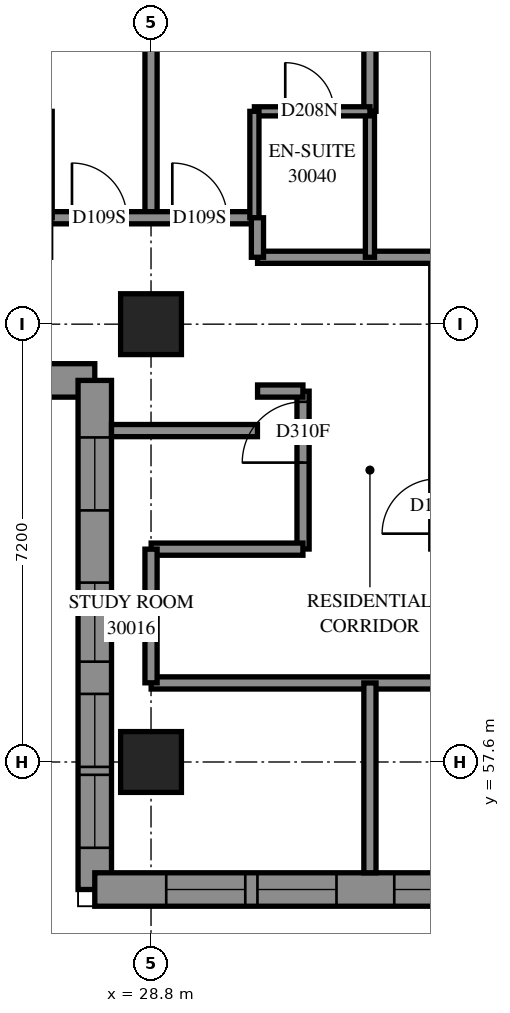
"""IFC4 building model, lengths in metres.
Left out: names, types, materials, properties, quantities, classifications, styles, units other than length and angle.
Written with IfcOpenShell. Run it as: python <this file> out.ifc"""

import sys

from ifc_helpers import new_model, si_unit, direction, frame, frame_2d, origin, origin_2d, place, context, subcontext, project, spatial, polyline, rectangle, outline, extrude, element, fill, save


model = new_model("IFC4")
c1 = context("Model", 3, precision=1e-05, world=origin(), true_north=direction((0.0, 1.0)))
c2 = subcontext(c1, "Body", "Model", "MODEL_VIEW")
j1 = project(units=[si_unit("LENGTHUNIT", "METRE"), si_unit("PLANEANGLEUNIT", "RADIAN")], contexts=[c1])
p1 = place(None, origin())
s1 = spatial("IfcSite", under=j1, at=p1, CompositionType="ELEMENT")
p2 = place(p1, origin())
s2 = spatial("IfcBuilding", under=s1, at=p2, CompositionType="ELEMENT")
p3 = place(p2, frame((0.0, 0.0, 111.8)))
s3 = spatial("IfcBuildingStorey", under=s2, at=p3, CompositionType="ELEMENT", Elevation=111.8)
for number, where, z_axis, x_axis in (
    (1, (28.8, 57.6, 0.0), (0.0, 0.0, 1.0), (1.0, 0.0, 0.0)),
    (2, (28.8, 64.8, 0.0), (0.0, 0.0, 1.0), (1.0, 0.0, 0.0)),
):
    element("IfcColumn", number, at=place(p3, frame(where, z_axis=z_axis, x_axis=x_axis)), inside=s3, PredefinedType="COLUMN", context=c2, shape_type="SweptSolid", body=[
        extrude(rectangle(XDim=1.0, YDim=1.0, at=origin_2d()), origin(), (0.0, 0.0, 1.0), 3.1),
    ])
p4 = place(p3, frame((19.503, 63.875, 0.0), z_axis=(0.0, 0.0, 1.0), x_axis=(1.0, 0.0, 0.0)))
e3 = element("IfcWall", 3, at=p4, inside=s3, PredefinedType="SOLIDWALL", context=c2, shape_type="SweptSolid", body=[
    extrude(outline(polyline([(-0.275, -0.275), (8.097, -0.275), (8.647, 0.275), (0.275, 0.275), (-0.275, -0.275)])), origin(), (0.0, 0.0, 1.0), 3.1),
])
p5 = place(p4, frame((2.247, 0.0, 0.5)))
e4 = element("IfcOpeningElement", 4, at=p5, cuts=e3, PredefinedType="OPENING", context=c2, shape_type="SweptSolid", body=[
    extrude(rectangle(XDim=1.3, YDim=2.45, at=frame_2d((0.65, 1.225))), frame((0.0, 0.285, 0.0), z_axis=(0.0, -1.0, 0.0), x_axis=(1.0, 0.0, 0.0)), (0.0, 0.0, 1.0), 0.57),
])
p6 = place(p4, frame((3.747, 0.0, 0.5)))
e5 = element("IfcOpeningElement", 5, at=p6, cuts=e3, PredefinedType="OPENING", context=c2, shape_type="SweptSolid", body=[
    extrude(rectangle(XDim=1.3, YDim=2.45, at=frame_2d((0.65, 1.225))), frame((0.0, 0.285, 0.0), z_axis=(0.0, -1.0, 0.0), x_axis=(1.0, 0.0, 0.0)), (0.0, 0.0, 1.0), 0.57),
])
p7 = place(p4, frame((0.686, 0.0, 0.5)))
e6 = element("IfcOpeningElement", 6, at=p7, cuts=e3, PredefinedType="OPENING", context=c2, shape_type="SweptSolid", body=[
    extrude(rectangle(XDim=1.2, YDim=2.45, at=frame_2d((0.6, 1.225))), frame((0.0, 0.285, 0.0), z_axis=(0.0, -1.0, 0.0), x_axis=(1.0, 0.0, 0.0)), (0.0, 0.0, 1.0), 0.57),
])
p8 = place(p4, frame((6.335, 0.0, 0.5)))
e7 = element("IfcOpeningElement", 7, at=p8, cuts=e3, PredefinedType="OPENING", context=c2, shape_type="SweptSolid", body=[
    extrude(rectangle(XDim=1.2, YDim=2.45, at=frame_2d((0.6, 1.225))), frame((0.0, 0.285, 0.0), z_axis=(0.0, -1.0, 0.0), x_axis=(1.0, 0.0, 0.0)), (0.0, 0.0, 1.0), 0.57),
])
p9 = place(p3, frame((27.875, 63.875, 0.0), z_axis=(0.0, 0.0, 1.0), x_axis=(0.0, -1.0, 0.0)))
e8 = element("IfcWall", 8, at=p9, inside=s3, PredefinedType="SOLIDWALL", context=c2, shape_type="SweptSolid", body=[
    extrude(outline(polyline([(0.275, -0.275), (8.647, -0.275), (8.097, 0.275), (-0.275, 0.275), (0.275, -0.275)])), origin(), (0.0, 0.0, 1.0), 3.1),
])
p10 = place(p9, frame((3.325, 0.0, 0.5)))
e9 = element("IfcOpeningElement", 9, at=p10, cuts=e8, PredefinedType="OPENING", context=c2, shape_type="SweptSolid", body=[
    extrude(rectangle(XDim=1.3, YDim=2.45, at=frame_2d((0.65, 1.225))), frame((0.0, 0.285, 0.0), z_axis=(0.0, -1.0, 0.0), x_axis=(1.0, 0.0, 0.0)), (0.0, 0.0, 1.0), 0.57),
])
p11 = place(p9, frame((0.938, 0.0, 0.5)))
e10 = element("IfcOpeningElement", 10, at=p11, cuts=e8, PredefinedType="OPENING", context=c2, shape_type="SweptSolid", body=[
    extrude(rectangle(XDim=1.2, YDim=2.45, at=frame_2d((0.6, 1.225))), frame((0.0, 0.285, 0.0), z_axis=(0.0, -1.0, 0.0), x_axis=(1.0, 0.0, 0.0)), (0.0, 0.0, 1.0), 0.57),
])
p12 = place(p9, frame((6.486, 0.0, 0.5)))
e11 = element("IfcOpeningElement", 11, at=p12, cuts=e8, PredefinedType="OPENING", context=c2, shape_type="SweptSolid", body=[
    extrude(rectangle(XDim=1.2, YDim=2.45, at=frame_2d((0.6, 1.225))), frame((0.0, 0.285, 0.0), z_axis=(0.0, -1.0, 0.0), x_axis=(1.0, 0.0, 0.0)), (0.0, 0.0, 1.0), 0.57),
])
p13 = place(p9, frame((5.155, 0.0, 0.5)))
e12 = element("IfcOpeningElement", 12, at=p13, cuts=e8, PredefinedType="OPENING", context=c2, shape_type="SweptSolid", body=[
    extrude(rectangle(XDim=1.2, YDim=2.45, at=frame_2d((0.6, 1.225))), frame((0.0, 0.285, 0.0), z_axis=(0.0, -1.0, 0.0), x_axis=(1.0, 0.0, 0.0)), (0.0, 0.0, 1.0), 0.57),
])
p14 = place(p3, frame((27.875, 55.503, 0.0), z_axis=(0.0, 0.0, 1.0), x_axis=(1.0, 0.0, 0.0)))
e13 = element("IfcWall", 13, at=p14, inside=s3, PredefinedType="SOLIDWALL", context=c2, shape_type="SweptSolid", body=[
    extrude(outline(polyline([(-0.275, -0.275), (14.125, -0.275), (14.675, 0.275), (0.275, 0.275), (-0.275, -0.275)])), origin(), (0.0, 0.0, 1.0), 3.1),
])
p15 = place(p14, frame((1.175, 0.0, 0.5)))
e14 = element("IfcOpeningElement", 14, at=p15, cuts=e13, PredefinedType="OPENING", context=c2, shape_type="SweptSolid", body=[
    extrude(rectangle(XDim=1.3, YDim=2.45, at=frame_2d((0.65, 1.225))), frame((0.0, 0.285, 0.0), z_axis=(0.0, -1.0, 0.0), x_axis=(1.0, 0.0, 0.0)), (0.0, 0.0, 1.0), 0.57),
])
p16 = place(p14, frame((2.675, 0.0, 0.5)))
e15 = element("IfcOpeningElement", 15, at=p16, cuts=e13, PredefinedType="OPENING", context=c2, shape_type="SweptSolid", body=[
    extrude(rectangle(XDim=1.3, YDim=2.45, at=frame_2d((0.65, 1.225))), frame((0.0, 0.285, 0.0), z_axis=(0.0, -1.0, 0.0), x_axis=(1.0, 0.0, 0.0)), (0.0, 0.0, 1.0), 0.57),
])
p17 = place(p14, frame((4.925, 0.0, 0.5)))
e16 = element("IfcOpeningElement", 16, at=p17, cuts=e13, PredefinedType="OPENING", context=c2, shape_type="SweptSolid", body=[
    extrude(rectangle(XDim=1.3, YDim=2.45, at=frame_2d((0.65, 1.225))), frame((0.0, 0.285, 0.0), z_axis=(0.0, -1.0, 0.0), x_axis=(1.0, 0.0, 0.0)), (0.0, 0.0, 1.0), 0.57),
])
p18 = place(p14, frame((6.425, 0.0, 0.5)))
e17 = element("IfcOpeningElement", 17, at=p18, cuts=e13, PredefinedType="OPENING", context=c2, shape_type="SweptSolid", body=[
    extrude(rectangle(XDim=1.3, YDim=2.45, at=frame_2d((0.65, 1.225))), frame((0.0, 0.285, 0.0), z_axis=(0.0, -1.0, 0.0), x_axis=(1.0, 0.0, 0.0)), (0.0, 0.0, 1.0), 0.57),
])
p19 = place(p14, frame((8.275, 0.0, 0.5)))
e18 = element("IfcOpeningElement", 18, at=p19, cuts=e13, PredefinedType="OPENING", context=c2, shape_type="SweptSolid", body=[
    extrude(rectangle(XDim=1.3, YDim=2.45, at=frame_2d((0.65, 1.225))), frame((0.0, 0.285, 0.0), z_axis=(0.0, -1.0, 0.0), x_axis=(1.0, 0.0, 0.0)), (0.0, 0.0, 1.0), 0.57),
])
p20 = place(p14, frame((9.775, 0.0, 0.5)))
e19 = element("IfcOpeningElement", 19, at=p20, cuts=e13, PredefinedType="OPENING", context=c2, shape_type="SweptSolid", body=[
    extrude(rectangle(XDim=1.3, YDim=2.45, at=frame_2d((0.65, 1.225))), frame((0.0, 0.285, 0.0), z_axis=(0.0, -1.0, 0.0), x_axis=(1.0, 0.0, 0.0)), (0.0, 0.0, 1.0), 0.57),
])
p21 = place(p14, frame((12.363, 0.0, 0.5)))
e20 = element("IfcOpeningElement", 20, at=p21, cuts=e13, PredefinedType="OPENING", context=c2, shape_type="SweptSolid", body=[
    extrude(rectangle(XDim=1.2, YDim=2.45, at=frame_2d((0.6, 1.225))), frame((0.0, 0.285, 0.0), z_axis=(0.0, -1.0, 0.0), x_axis=(1.0, 0.0, 0.0)), (0.0, 0.0, 1.0), 0.57),
])
p22 = place(p3, frame((28.802, 58.9, 0.0), z_axis=(0.0, 0.0, 1.0), x_axis=(1.0, 0.0, 0.0)))
e21 = element("IfcWall", 21, at=p22, inside=s3, PredefinedType="PARTITIONING", context=c2, shape_type="SweptSolid", body=[
    extrude(rectangle(XDim=24.098, YDim=0.2, at=frame_2d((12.049, 0.0))), origin(), (0.0, 0.0, 1.0), 3.1),
])
p23 = place(p22, frame((11.323, 0.0, 0.0)))
e22 = element("IfcOpeningElement", 22, at=p23, cuts=e21, PredefinedType="OPENING", context=c2, shape_type="SweptSolid", body=[
    extrude(rectangle(XDim=1.0, YDim=2.1, at=frame_2d((0.5, 1.05))), frame((0.0, 0.11, 0.0), z_axis=(0.0, -1.0, 0.0), x_axis=(1.0, 0.0, 0.0)), (0.0, 0.0, 1.0), 0.22),
])
p24 = place(p22, frame((14.908, 0.0, 0.0)))
e23 = element("IfcOpeningElement", 23, at=p24, cuts=e21, PredefinedType="OPENING", context=c2, shape_type="SweptSolid", body=[
    extrude(rectangle(XDim=0.9, YDim=2.1, at=frame_2d((0.45, 1.05))), frame((0.0, 0.11, 0.0), z_axis=(0.0, -1.0, 0.0), x_axis=(1.0, 0.0, 0.0)), (0.0, 0.0, 1.0), 0.22),
])
p25 = place(p22, frame((18.523, 0.0, 0.0)))
e24 = element("IfcOpeningElement", 24, at=p25, cuts=e21, PredefinedType="OPENING", context=c2, shape_type="SweptSolid", body=[
    extrude(rectangle(XDim=1.0, YDim=2.1, at=frame_2d((0.5, 1.05))), frame((0.0, 0.11, 0.0), z_axis=(0.0, -1.0, 0.0), x_axis=(1.0, 0.0, 0.0)), (0.0, 0.0, 1.0), 0.22),
])
p26 = place(p22, frame((22.845, 0.0, 0.0)))
e25 = element("IfcOpeningElement", 25, at=p26, cuts=e21, PredefinedType="OPENING", context=c2, shape_type="SweptSolid", body=[
    extrude(rectangle(XDim=1.0, YDim=2.1, at=frame_2d((0.5, 1.05))), frame((0.0, 0.11, 0.0), z_axis=(0.0, -1.0, 0.0), x_axis=(1.0, 0.0, 0.0)), (0.0, 0.0, 1.0), 0.22),
])
p27 = place(p3, frame((28.8, 66.55, 0.0), z_axis=(0.0, 0.0, 1.0), x_axis=(0.0, 1.0, 0.0)))
e26 = element("IfcWall", 26, at=p27, inside=s3, PredefinedType="PARTITIONING", context=c2, shape_type="SweptSolid", body=[
    extrude(rectangle(XDim=4.95, YDim=0.2, at=frame_2d((2.475, 0.0))), origin(), (0.0, 0.0, 1.0), 3.1),
])
p28 = place(p3, frame((32.4, 68.3, 0.0), z_axis=(0.0, 0.0, 1.0), x_axis=(0.0, 1.0, 0.0)))
e27 = element("IfcWall", 27, at=p28, inside=s3, PredefinedType="PARTITIONING", context=c2, shape_type="SweptSolid", body=[
    extrude(rectangle(XDim=4.606, YDim=0.2, at=frame_2d((2.303, 0.0))), origin(), (0.0, 0.0, 1.0), 3.1),
])
p29 = place(p3, frame((27.1, 66.55, 0.0), z_axis=(0.0, 0.0, 1.0), x_axis=(1.0, 0.0, 0.0)))
e28 = element("IfcWall", 28, at=p29, inside=s3, PredefinedType="PARTITIONING", context=c2, shape_type="SweptSolid", body=[
    extrude(rectangle(XDim=3.4, YDim=0.2, at=frame_2d((1.7, 0.0))), origin(), (0.0, 0.0, 1.0), 3.1),
])
p30 = place(p29, frame((0.4, 0.0, 0.0)))
e29 = element("IfcOpeningElement", 29, at=p30, cuts=e28, PredefinedType="OPENING", context=c2, shape_type="SweptSolid", body=[
    extrude(rectangle(XDim=0.9, YDim=2.1, at=frame_2d((0.45, 1.05))), frame((0.0, 0.11, 0.0), z_axis=(0.0, -1.0, 0.0), x_axis=(1.0, 0.0, 0.0)), (0.0, 0.0, 1.0), 0.22),
])
p31 = place(p29, frame((2.05, 0.0, 0.0)))
e30 = element("IfcOpeningElement", 30, at=p31, cuts=e28, PredefinedType="OPENING", context=c2, shape_type="SweptSolid", body=[
    extrude(rectangle(XDim=0.9, YDim=2.1, at=frame_2d((0.45, 1.05))), frame((0.0, 0.11, 0.0), z_axis=(0.0, -1.0, 0.0), x_axis=(1.0, 0.0, 0.0)), (0.0, 0.0, 1.0), 0.22),
])
p32 = place(p3, frame((32.4, 55.778, 0.0), z_axis=(0.0, 0.0, 1.0), x_axis=(0.0, 1.0, 0.0)))
e31 = element("IfcWall", 31, at=p32, inside=s3, PredefinedType="PARTITIONING", context=c2, shape_type="SweptSolid", body=[
    extrude(rectangle(XDim=3.122, YDim=0.2, at=frame_2d((1.561, 0.0))), origin(), (0.0, 0.0, 1.0), 3.1),
])
p33 = place(p3, frame((30.552, 65.9, 0.0), z_axis=(0.0, 0.0, 1.0), x_axis=(1.0, 0.0, 0.0)))
e32 = element("IfcWall", 32, at=p33, inside=s3, PredefinedType="PARTITIONING", context=c2, shape_type="SweptSolid", body=[
    extrude(rectangle(XDim=2.948, YDim=0.2, at=frame_2d((1.474, 0.0))), origin(), (0.0, 0.0, 1.0), 3.1),
])
p34 = place(p3, frame((31.3, 61.102, 0.0), z_axis=(0.0, 0.0, 1.0), x_axis=(0.0, 1.0, 0.0)))
e33 = element("IfcWall", 33, at=p34, inside=s3, PredefinedType="PARTITIONING", context=c2, shape_type="SweptSolid", body=[
    extrude(rectangle(XDim=2.596, YDim=0.2, at=frame_2d((1.298, 0.0))), origin(), (0.0, 0.0, 1.0), 3.1),
])
p35 = place(p34, frame((1.421, 0.0, 0.0)))
e34 = element("IfcOpeningElement", 34, at=p35, cuts=e33, PredefinedType="OPENING", context=c2, shape_type="SweptSolid", body=[
    extrude(rectangle(XDim=1.0, YDim=2.1, at=frame_2d((0.5, 1.05))), frame((0.0, 0.11, 0.0), z_axis=(0.0, -1.0, 0.0), x_axis=(1.0, 0.0, 0.0)), (0.0, 0.0, 1.0), 0.22),
])
p36 = place(p3, frame((28.802, 61.1, 0.0), z_axis=(0.0, 0.0, 1.0), x_axis=(1.0, 0.0, 0.0)))
e35 = element("IfcWall", 35, at=p36, inside=s3, PredefinedType="PARTITIONING", context=c2, shape_type="SweptSolid", body=[
    extrude(rectangle(XDim=2.496, YDim=0.2, at=frame_2d((1.248, 0.0))), origin(), (0.0, 0.0, 1.0), 3.1),
])
p37 = place(p3, frame((32.4, 65.9, 0.0), z_axis=(0.0, 0.0, 1.0), x_axis=(0.0, 1.0, 0.0)))
e36 = element("IfcWall", 36, at=p37, inside=s3, PredefinedType="PARTITIONING", context=c2, shape_type="SweptSolid", body=[
    extrude(rectangle(XDim=2.4, YDim=0.15, at=frame_2d((1.2, 0.0))), origin(), (0.0, 0.0, 1.0), 3.1),
])
p38 = place(p3, frame((28.15, 63.05, 0.0), z_axis=(0.0, 0.0, 1.0), x_axis=(1.0, 0.0, 0.0)))
e37 = element("IfcWall", 37, at=p38, inside=s3, PredefinedType="PARTITIONING", context=c2, shape_type="SweptSolid", body=[
    extrude(rectangle(XDim=2.4, YDim=0.2, at=frame_2d((1.2, 0.0))), origin(), (0.0, 0.0, 1.0), 3.1),
])
p39 = place(p3, frame((28.8, 58.902, 0.0), z_axis=(0.0, 0.0, 1.0), x_axis=(0.0, 1.0, 0.0)))
e38 = element("IfcWall", 38, at=p39, inside=s3, PredefinedType="PARTITIONING", context=c2, shape_type="SweptSolid", body=[
    extrude(rectangle(XDim=2.198, YDim=0.2, at=frame_2d((1.099, 0.0))), origin(), (0.0, 0.0, 1.0), 2.6),
])
p40 = place(p3, frame((30.5, 68.3, 0.0), z_axis=(0.0, 0.0, 1.0), x_axis=(1.0, 0.0, 0.0)))
e39 = element("IfcWall", 39, at=p40, inside=s3, PredefinedType="PARTITIONING", context=c2, shape_type="SweptSolid", body=[
    extrude(rectangle(XDim=1.9, YDim=0.15, at=frame_2d((0.95, 0.0))), origin(), (0.0, 0.0, 1.0), 3.1),
])
p41 = place(p40, frame((0.507, 0.0, 0.0)))
e40 = element("IfcOpeningElement", 40, at=p41, cuts=e39, PredefinedType="OPENING", context=c2, shape_type="SweptSolid", body=[
    extrude(rectangle(XDim=0.8, YDim=2.1, at=frame_2d((0.4, 1.05))), frame((0.0, 0.085, 0.0), z_axis=(0.0, -1.0, 0.0), x_axis=(1.0, 0.0, 0.0)), (0.0, 0.0, 1.0), 0.17),
])
for number, where, z_axis, x_axis in (
    (41, (27.1, 66.55, 0.0), (0.0, 0.0, 1.0), (0.0, 1.0, 0.0)),
    (42, (30.5, 66.55, 0.0), (0.0, 0.0, 1.0), (0.0, 1.0, 0.0)),
):
    element("IfcWall", number, at=place(p3, frame(where, z_axis=z_axis, x_axis=x_axis)), inside=s3, PredefinedType="PARTITIONING", context=c2, shape_type="SweptSolid", body=[
        extrude(rectangle(XDim=1.75, YDim=0.15, at=frame_2d((0.875, 0.0))), origin(), (0.0, 0.0, 1.0), 3.1),
    ])
p42 = place(p3, frame((30.552, 63.7, 0.0), z_axis=(0.0, 0.0, 1.0), x_axis=(1.0, 0.0, 0.0)))
e43 = element("IfcWall", 43, at=p42, inside=s3, PredefinedType="PARTITIONING", context=c2, shape_type="SweptSolid", body=[
    extrude(rectangle(XDim=0.746, YDim=0.2, at=frame_2d((0.373, 0.0))), origin(), (0.0, 0.0, 1.0), 3.1),
])
p43 = place(p3, frame((30.55, 65.9, 0.0), z_axis=(0.0, 0.0, 1.0), x_axis=(0.0, 1.0, 0.0)))
e44 = element("IfcWall", 44, at=p43, inside=s3, PredefinedType="PARTITIONING", context=c2, shape_type="SweptSolid", body=[
    extrude(rectangle(XDim=0.65, YDim=0.2, at=frame_2d((0.325, 0.0))), origin(), (0.0, 0.0, 1.0), 3.1),
])
p44 = place(p10, origin())
e45 = element("IfcWindow", 45, at=p44, inside=s3, PartitioningType="SINGLE_PANEL", PredefinedType="WINDOW", context=c2, shape_type="SweptSolid", body=[
    extrude(rectangle(XDim=1.3, YDim=2.45, at=frame_2d((0.65, 1.225))), frame((0.0, 0.155, 0.0), z_axis=(0.0, -1.0, 0.0), x_axis=(1.0, 0.0, 0.0)), (0.0, 0.0, 1.0), 0.06),
])
fill(e9, e45)
p45 = place(p11, origin())
e46 = element("IfcWindow", 46, at=p45, inside=s3, PartitioningType="SINGLE_PANEL", PredefinedType="WINDOW", context=c2, shape_type="SweptSolid", body=[
    extrude(rectangle(XDim=1.2, YDim=2.45, at=frame_2d((0.6, 1.225))), frame((0.0, 0.155, 0.0), z_axis=(0.0, -1.0, 0.0), x_axis=(1.0, 0.0, 0.0)), (0.0, 0.0, 1.0), 0.06),
])
fill(e10, e46)
p46 = place(p12, origin())
e47 = element("IfcWindow", 47, at=p46, inside=s3, PartitioningType="SINGLE_PANEL", PredefinedType="WINDOW", context=c2, shape_type="SweptSolid", body=[
    extrude(rectangle(XDim=1.2, YDim=2.45, at=frame_2d((0.6, 1.225))), frame((0.0, 0.155, 0.0), z_axis=(0.0, -1.0, 0.0), x_axis=(1.0, 0.0, 0.0)), (0.0, 0.0, 1.0), 0.06),
])
fill(e11, e47)
p47 = place(p15, origin())
e48 = element("IfcWindow", 48, at=p47, inside=s3, PartitioningType="SINGLE_PANEL", PredefinedType="WINDOW", context=c2, shape_type="SweptSolid", body=[
    extrude(rectangle(XDim=1.3, YDim=2.45, at=frame_2d((0.65, 1.225))), frame((0.0, 0.155, 0.0), z_axis=(0.0, -1.0, 0.0), x_axis=(1.0, 0.0, 0.0)), (0.0, 0.0, 1.0), 0.06),
])
fill(e14, e48)
p48 = place(p16, origin())
e49 = element("IfcWindow", 49, at=p48, inside=s3, PartitioningType="SINGLE_PANEL", PredefinedType="WINDOW", context=c2, shape_type="SweptSolid", body=[
    extrude(rectangle(XDim=1.3, YDim=2.45, at=frame_2d((0.65, 1.225))), frame((0.0, 0.155, 0.0), z_axis=(0.0, -1.0, 0.0), x_axis=(1.0, 0.0, 0.0)), (0.0, 0.0, 1.0), 0.06),
])
fill(e15, e49)
p49 = place(p17, origin())
e50 = element("IfcWindow", 50, at=p49, inside=s3, PartitioningType="SINGLE_PANEL", PredefinedType="WINDOW", context=c2, shape_type="SweptSolid", body=[
    extrude(rectangle(XDim=1.3, YDim=2.45, at=frame_2d((0.65, 1.225))), frame((0.0, 0.155, 0.0), z_axis=(0.0, -1.0, 0.0), x_axis=(1.0, 0.0, 0.0)), (0.0, 0.0, 1.0), 0.06),
])
fill(e16, e50)
p50 = place(p35, origin())
e51 = element("IfcDoor", 51, at=p50, inside=s3, OperationType="SINGLE_SWING_LEFT", PredefinedType="DOOR", context=c2, shape_type="SweptSolid", body=[
    extrude(rectangle(XDim=1.0, YDim=2.1, at=frame_2d((0.5, 1.05))), frame((0.0, 0.025, 0.0), z_axis=(0.0, -1.0, 0.0), x_axis=(1.0, 0.0, 0.0)), (0.0, 0.0, 1.0), 0.05),
])
fill(e34, e51)
p51 = place(p30, origin())
e52 = element("IfcDoor", 52, at=p51, inside=s3, OperationType="SINGLE_SWING_LEFT", PredefinedType="DOOR", context=c2, shape_type="SweptSolid", body=[
    extrude(rectangle(XDim=0.9, YDim=2.1, at=frame_2d((0.45, 1.05))), frame((0.0, 0.025, 0.0), z_axis=(0.0, -1.0, 0.0), x_axis=(1.0, 0.0, 0.0)), (0.0, 0.0, 1.0), 0.05),
])
fill(e29, e52)
p52 = place(p31, origin())
e53 = element("IfcDoor", 53, at=p52, inside=s3, OperationType="SINGLE_SWING_RIGHT", PredefinedType="DOOR", context=c2, shape_type="SweptSolid", body=[
    extrude(rectangle(XDim=0.9, YDim=2.1, at=frame_2d((0.45, 1.05))), frame((0.0, 0.025, 0.0), z_axis=(0.0, -1.0, 0.0), x_axis=(1.0, 0.0, 0.0)), (0.0, 0.0, 1.0), 0.05),
])
fill(e30, e53)
p53 = place(p41, origin())
e54 = element("IfcDoor", 54, at=p53, inside=s3, OperationType="SINGLE_SWING_RIGHT", PredefinedType="DOOR", context=c2, shape_type="SweptSolid", body=[
    extrude(rectangle(XDim=0.8, YDim=2.1, at=frame_2d((0.4, 1.05))), frame((0.0, 0.025, 0.0), z_axis=(0.0, -1.0, 0.0), x_axis=(1.0, 0.0, 0.0)), (0.0, 0.0, 1.0), 0.05),
])
fill(e40, e54)
p54 = place(p13, origin())
e55 = element("IfcWindow", 55, at=p54, inside=s3, PartitioningType="SINGLE_PANEL", PredefinedType="WINDOW", context=c2, shape_type="SweptSolid", body=[
    extrude(rectangle(XDim=1.2, YDim=2.45, at=frame_2d((0.6, 1.225))), frame((0.0, 0.155, 0.0), z_axis=(0.0, -1.0, 0.0), x_axis=(1.0, 0.0, 0.0)), (0.0, 0.0, 1.0), 0.06),
])
fill(e12, e55)
save(model, sys.argv[1])
